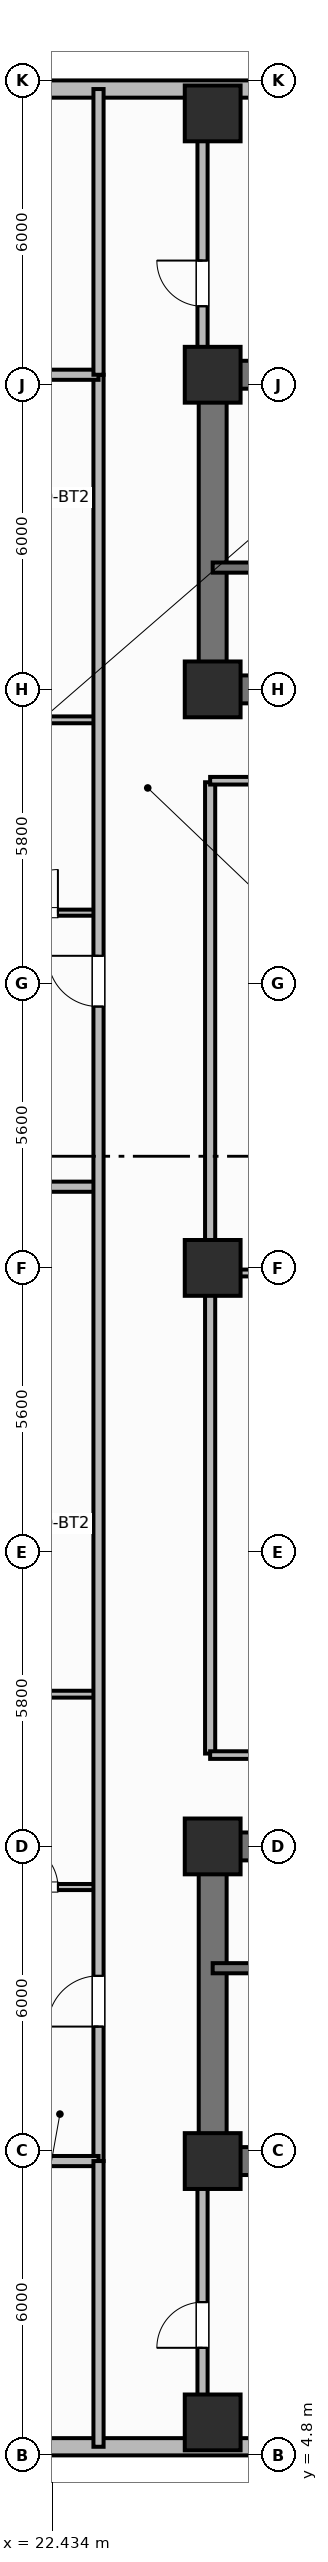
"""IFC4 building model, lengths in metres.
Left out: names, types, materials, properties, quantities, classifications, styles, units other than length and angle.
Written with IfcOpenShell. Run it as: python <this file> out.ifc"""

import sys

from ifc_helpers import new_model, si_unit, direction, frame, frame_2d, origin, origin_2d, place, context, subcontext, project, spatial, rectangle, extrude, element, fill, save


model = new_model("IFC4")
c1 = context("Model", 3, precision=1e-05, world=origin(), true_north=direction((0.0, 1.0)))
c2 = subcontext(c1, "Body", "Model", "MODEL_VIEW")
j1 = project(units=[si_unit("LENGTHUNIT", "METRE"), si_unit("PLANEANGLEUNIT", "RADIAN")], contexts=[c1])
p1 = place(None, origin())
s1 = spatial("IfcSite", under=j1, at=p1, CompositionType="ELEMENT")
p2 = place(p1, origin())
s2 = spatial("IfcBuilding", under=s1, at=p2, CompositionType="ELEMENT")
p3 = place(p2, frame((0.0, 0.0, 88.3)))
s3 = spatial("IfcBuildingStorey", under=s2, at=p3, CompositionType="ELEMENT", Elevation=88.3)
p4 = place(p3, frame((52.8, 10.6, 0.0), z_axis=(0.0, 0.0, 1.0), x_axis=(-1.0, 0.0, 0.0)))
e1 = element("IfcWall", 1, at=p4, inside=s3, PredefinedType="SHEAR", context=c2, shape_type="SweptSolid", body=[
    extrude(rectangle(XDim=27.2, YDim=0.55, at=frame_2d((13.6, 0.0))), origin(), (0.0, 0.0, 1.0), 3.7),
])
p5 = place(p3, frame((25.6, 10.875, 0.0), z_axis=(0.0, 0.0, 1.0), x_axis=(0.0, 1.0, 0.0)))
e2 = element("IfcWall", 2, at=p5, inside=s3, PredefinedType="SHEAR", context=c2, shape_type="SweptSolid", body=[
    extrude(rectangle(XDim=5.65, YDim=0.55, at=frame_2d((2.825, 0.0))), origin(), (0.0, 0.0, 1.0), 3.7),
])
p6 = place(p3, frame((25.6, 16.8, 0.0), z_axis=(0.0, 0.0, 1.0), x_axis=(1.0, 0.0, 0.0)))
e3 = element("IfcWall", 3, at=p6, inside=s3, PredefinedType="SHEAR", context=c2, shape_type="SweptSolid", body=[
    extrude(rectangle(XDim=27.2, YDim=0.55, at=frame_2d((13.6, 0.0))), origin(), (0.0, 0.0, 1.0), 3.7),
])
p7 = place(p6, frame((1.9, 0.0, 0.0)))
e4 = element("IfcOpeningElement", 4, at=p7, cuts=e3, PredefinedType="OPENING", context=c2, shape_type="SweptSolid", body=[
    extrude(rectangle(XDim=1.1, YDim=2.15, at=frame_2d((0.55, 1.075))), frame((0.0, 0.285, 0.0), z_axis=(0.0, -1.0, 0.0), x_axis=(1.0, 0.0, 0.0)), (0.0, 0.0, 1.0), 0.57),
])
p8 = place(p6, frame((13.0, 0.0, 0.0)))
e5 = element("IfcOpeningElement", 5, at=p8, cuts=e3, PredefinedType="OPENING", context=c2, shape_type="SweptSolid", body=[
    extrude(rectangle(XDim=1.2, YDim=2.15, at=frame_2d((0.6, 1.075))), frame((0.0, 0.285, 0.0), z_axis=(0.0, -1.0, 0.0), x_axis=(1.0, 0.0, 0.0)), (0.0, 0.0, 1.0), 0.57),
])
p9 = place(p6, frame((20.4, 0.0, 0.0)))
e6 = element("IfcOpeningElement", 6, at=p9, cuts=e3, PredefinedType="OPENING", context=c2, shape_type="SweptSolid", body=[
    extrude(rectangle(XDim=1.3, YDim=2.2, at=frame_2d((0.65, 1.1))), frame((0.0, 0.285, 0.0), z_axis=(0.0, -1.0, 0.0), x_axis=(1.0, 0.0, 0.0)), (0.0, 0.0, 1.0), 0.57),
])
p10 = place(p6, frame((24.65, 0.0, 0.0)))
e7 = element("IfcOpeningElement", 7, at=p10, cuts=e3, PredefinedType="OPENING", context=c2, shape_type="SweptSolid", body=[
    extrude(rectangle(XDim=0.85, YDim=2.1, at=frame_2d((0.425, 1.05))), frame((0.0, 0.285, 0.0), z_axis=(0.0, -1.0, 0.0), x_axis=(1.0, 0.0, 0.0)), (0.0, 0.0, 1.0), 0.57),
])
p11 = place(p3, frame((25.6, 45.8, 0.0), z_axis=(0.0, 0.0, 1.0), x_axis=(1.0, 0.0, 0.0)))
e8 = element("IfcWall", 8, at=p11, inside=s3, PredefinedType="SHEAR", context=c2, shape_type="SweptSolid", body=[
    extrude(rectangle(XDim=27.2, YDim=0.55, at=frame_2d((13.6, 0.0))), origin(), (0.0, 0.0, 1.0), 3.7),
])
p12 = place(p3, frame((25.6, 39.875, 0.0), z_axis=(0.0, 0.0, 1.0), x_axis=(0.0, 1.0, 0.0)))
e9 = element("IfcWall", 9, at=p12, inside=s3, PredefinedType="SHEAR", context=c2, shape_type="SweptSolid", body=[
    extrude(rectangle(XDim=5.65, YDim=0.55, at=frame_2d((2.825, 0.0))), origin(), (0.0, 0.0, 1.0), 3.7),
])
p13 = place(p3, frame((52.8, 39.6, 0.0), z_axis=(0.0, 0.0, 1.0), x_axis=(-1.0, 0.0, 0.0)))
e10 = element("IfcWall", 10, at=p13, inside=s3, PredefinedType="SHEAR", context=c2, shape_type="SweptSolid", body=[
    extrude(rectangle(XDim=27.2, YDim=0.55, at=frame_2d((13.6, 0.0))), origin(), (0.0, 0.0, 1.0), 3.7),
])
p14 = place(p13, frame((24.2, 0.0, 0.0)))
e11 = element("IfcOpeningElement", 11, at=p14, cuts=e10, PredefinedType="OPENING", context=c2, shape_type="SweptSolid", body=[
    extrude(rectangle(XDim=1.1, YDim=2.15, at=frame_2d((0.55, 1.075))), frame((0.0, 0.285, 0.0), z_axis=(0.0, -1.0, 0.0), x_axis=(1.0, 0.0, 0.0)), (0.0, 0.0, 1.0), 0.57),
])
p15 = place(p13, frame((15.1, 0.0, 0.0)))
e12 = element("IfcOpeningElement", 12, at=p15, cuts=e10, PredefinedType="OPENING", context=c2, shape_type="SweptSolid", body=[
    extrude(rectangle(XDim=1.2, YDim=2.15, at=frame_2d((0.6, 1.075))), frame((0.0, 0.285, 0.0), z_axis=(0.0, -1.0, 0.0), x_axis=(1.0, 0.0, 0.0)), (0.0, 0.0, 1.0), 0.57),
])
p16 = place(p13, frame((11.3, 0.0, 0.0)))
e13 = element("IfcOpeningElement", 13, at=p16, cuts=e10, PredefinedType="OPENING", context=c2, shape_type="SweptSolid", body=[
    extrude(rectangle(XDim=1.3, YDim=2.2, at=frame_2d((0.65, 1.1))), frame((0.0, 0.285, 0.0), z_axis=(0.0, -1.0, 0.0), x_axis=(1.0, 0.0, 0.0)), (0.0, 0.0, 1.0), 0.57),
])
p17 = place(p13, frame((7.25, 0.0, 0.0)))
e14 = element("IfcOpeningElement", 14, at=p17, cuts=e10, PredefinedType="OPENING", context=c2, shape_type="SweptSolid", body=[
    extrude(rectangle(XDim=0.85, YDim=2.1, at=frame_2d((0.425, 1.05))), frame((0.0, 0.285, 0.0), z_axis=(0.0, -1.0, 0.0), x_axis=(1.0, 0.0, 0.0)), (0.0, 0.0, 1.0), 0.57),
])
p18 = place(p13, frame((3.0, 0.0, 0.0)))
e15 = element("IfcOpeningElement", 15, at=p18, cuts=e10, PredefinedType="OPENING", context=c2, shape_type="SweptSolid", body=[
    extrude(rectangle(XDim=0.9, YDim=2.1, at=frame_2d((0.45, 1.05))), frame((0.0, 0.285, 0.0), z_axis=(0.0, -1.0, 0.0), x_axis=(1.0, 0.0, 0.0)), (0.0, 0.0, 1.0), 0.57),
])
for number, where, z_axis, x_axis in (
    (16, (25.6, 10.6, 0.0), (0.0, 0.0, 1.0), (1.0, 0.0, 0.0)),
    (17, (25.6, 16.8, 0.0), (0.0, 0.0, 1.0), (1.0, 0.0, 0.0)),
    (18, (25.6, 39.6, 0.0), (0.0, 0.0, 1.0), (1.0, 0.0, 0.0)),
    (19, (25.6, 45.8, 0.0), (0.0, 0.0, 1.0), (1.0, 0.0, 0.0)),
    (20, (25.6, 28.2, 0.0), (0.0, 0.0, 1.0), (1.0, 0.0, 0.0)),
    (21, (25.6, 5.45, 0.0), (0.0, 0.0, 1.0), (1.0, 0.0, 0.0)),
    (22, (25.6, 50.95, 0.0), (0.0, 0.0, 1.0), (1.0, 0.0, 0.0)),
):
    element("IfcColumn", number, at=place(p3, frame(where, z_axis=z_axis, x_axis=x_axis)), inside=s3, PredefinedType="COLUMN", context=c2, shape_type="SweptSolid", body=[
        extrude(rectangle(XDim=1.1, YDim=1.1, at=origin_2d()), origin(), (0.0, 0.0, 1.0), 3.7),
    ])
p19 = place(p3, frame((18.6, 4.97, 0.0), z_axis=(0.0, 0.0, 1.0), x_axis=(1.0, 0.0, 0.0)))
e23 = element("IfcWall", 23, at=p19, inside=s3, PredefinedType="SOLIDWALL", context=c2, shape_type="SweptSolid", body=[
    extrude(rectangle(XDim=17.4, YDim=0.34, at=frame_2d((8.7, 0.0))), origin(), (0.0, 0.0, 1.0), 2.7),
])
p20 = place(p19, frame((1.46, 0.0, 0.68)))
e24 = element("IfcOpeningElement", 24, at=p20, cuts=e23, PredefinedType="OPENING", context=c2, shape_type="SweptSolid", body=[
    extrude(rectangle(XDim=1.6, YDim=1.9, at=frame_2d((0.8, 0.95))), frame((0.0, 0.18, 0.0), z_axis=(0.0, -1.0, 0.0), x_axis=(1.0, 0.0, 0.0)), (0.0, 0.0, 1.0), 0.36),
])
p21 = place(p19, frame((8.25, 0.0, 0.68)))
e25 = element("IfcOpeningElement", 25, at=p21, cuts=e23, PredefinedType="OPENING", context=c2, shape_type="SweptSolid", body=[
    extrude(rectangle(XDim=1.6, YDim=1.9, at=frame_2d((0.8, 0.95))), frame((0.0, 0.18, 0.0), z_axis=(0.0, -1.0, 0.0), x_axis=(1.0, 0.0, 0.0)), (0.0, 0.0, 1.0), 0.36),
])
p22 = place(p19, frame((13.64, 0.0, 0.68)))
e26 = element("IfcOpeningElement", 26, at=p22, cuts=e23, PredefinedType="OPENING", context=c2, shape_type="SweptSolid", body=[
    extrude(rectangle(XDim=1.6, YDim=1.9, at=frame_2d((0.8, 0.95))), frame((0.0, 0.18, 0.0), z_axis=(0.0, -1.0, 0.0), x_axis=(1.0, 0.0, 0.0)), (0.0, 0.0, 1.0), 0.36),
])
p23 = place(p3, frame((36.0, 51.43, 0.0), z_axis=(0.0, 0.0, 1.0), x_axis=(-1.0, 0.0, 0.0)))
e27 = element("IfcWall", 27, at=p23, inside=s3, PredefinedType="SOLIDWALL", context=c2, shape_type="SweptSolid", body=[
    extrude(rectangle(XDim=17.4, YDim=0.34, at=frame_2d((8.7, 0.0))), origin(), (0.0, 0.0, 1.0), 2.7),
])
p24 = place(p23, frame((5.637, 0.0, 0.68)))
e28 = element("IfcOpeningElement", 28, at=p24, cuts=e27, PredefinedType="OPENING", context=c2, shape_type="SweptSolid", body=[
    extrude(rectangle(XDim=2.1, YDim=1.9, at=frame_2d((1.05, 0.95))), frame((0.0, 0.18, 0.0), z_axis=(0.0, -1.0, 0.0), x_axis=(1.0, 0.0, 0.0)), (0.0, 0.0, 1.0), 0.36),
])
p25 = place(p23, frame((13.688, 0.0, 0.68)))
e29 = element("IfcOpeningElement", 29, at=p25, cuts=e27, PredefinedType="OPENING", context=c2, shape_type="SweptSolid", body=[
    extrude(rectangle(XDim=2.1, YDim=1.9, at=frame_2d((1.05, 0.95))), frame((0.0, 0.18, 0.0), z_axis=(0.0, -1.0, 0.0), x_axis=(1.0, 0.0, 0.0)), (0.0, 0.0, 1.0), 0.36),
])
p26 = place(p3, frame((25.6, 14.4, 0.0), z_axis=(0.0, 0.0, 1.0), x_axis=(1.0, 0.0, 0.0)))
e30 = element("IfcWall", 30, at=p26, inside=s3, PredefinedType="SHEAR", context=c2, shape_type="SweptSolid", body=[
    extrude(rectangle(XDim=9.55, YDim=0.2, at=frame_2d((4.775, 0.0))), origin(), (0.0, 0.0, 1.0), 3.7),
])
p27 = place(p26, frame((1.05, 0.0, 0.0)))
e31 = element("IfcOpeningElement", 31, at=p27, cuts=e30, PredefinedType="OPENING", context=c2, shape_type="SweptSolid", body=[
    extrude(rectangle(XDim=1.1, YDim=2.15, at=frame_2d((0.55, 1.075))), frame((0.0, 0.11, 0.0), z_axis=(0.0, -1.0, 0.0), x_axis=(1.0, 0.0, 0.0)), (0.0, 0.0, 1.0), 0.22),
])
p28 = place(p3, frame((35.15, 42.0, 0.0), z_axis=(0.0, 0.0, 1.0), x_axis=(-1.0, 0.0, 0.0)))
e32 = element("IfcWall", 32, at=p28, inside=s3, PredefinedType="SHEAR", context=c2, shape_type="SweptSolid", body=[
    extrude(rectangle(XDim=9.55, YDim=0.2, at=frame_2d((4.775, 0.0))), origin(), (0.0, 0.0, 1.0), 3.7),
])
p29 = place(p28, frame((7.25, 0.0, 0.0)))
e33 = element("IfcOpeningElement", 33, at=p29, cuts=e32, PredefinedType="OPENING", context=c2, shape_type="SweptSolid", body=[
    extrude(rectangle(XDim=1.1, YDim=2.15, at=frame_2d((0.55, 1.075))), frame((0.0, 0.11, 0.0), z_axis=(0.0, -1.0, 0.0), x_axis=(1.0, 0.0, 0.0)), (0.0, 0.0, 1.0), 0.22),
])
p30 = place(p3, frame((25.55, 18.63, 0.0), z_axis=(0.0, 0.0, 1.0), x_axis=(0.0, 1.0, 0.0)))
e34 = element("IfcWall", 34, at=p30, inside=s3, PredefinedType="PARTITIONING", context=c2, shape_type="SweptSolid", body=[
    extrude(rectangle(XDim=19.14, YDim=0.2, at=frame_2d((9.57, 0.0))), origin(), (0.0, 0.0, 1.0), 2.53),
])
for number, where, z_axis, x_axis in (
    (35, (25.55, 18.6, 0.0), (0.0, 0.0, 1.0), (1.0, 0.0, 0.0)),
    (36, (25.55, 37.8, 0.0), (0.0, 0.0, 1.0), (1.0, 0.0, 0.0)),
):
    element("IfcWall", number, at=place(p3, frame(where, z_axis=z_axis, x_axis=x_axis)), inside=s3, PredefinedType="PARTITIONING", context=c2, shape_type="SweptSolid", body=[
        extrude(rectangle(XDim=6.5, YDim=0.15, at=frame_2d((3.25, 0.0))), origin(), (0.0, 0.0, 1.0), 2.53),
    ])
p31 = place(p3, frame((25.6, 28.1, 0.0), z_axis=(0.0, 0.0, 1.0), x_axis=(1.0, 0.0, 0.0)))
e37 = element("IfcWall", 37, at=p31, inside=s3, PredefinedType="PARTITIONING", context=c2, shape_type="SweptSolid", body=[
    extrude(rectangle(XDim=6.42, YDim=0.135, at=frame_2d((3.21, 0.0))), origin(), (0.0, 0.0, 1.0), 2.53),
])
p32 = place(p3, frame((21.1, 16.0, 0.0), z_axis=(0.0, 0.0, 1.0), x_axis=(1.0, 0.0, 0.0)))
e38 = element("IfcWall", 38, at=p32, inside=s3, PredefinedType="PARTITIONING", context=c2, shape_type="SweptSolid", body=[
    extrude(rectangle(XDim=2.25, YDim=0.12, at=frame_2d((1.125, 0.0))), origin(), (0.0, 0.0, 1.0), 2.53),
])
p33 = place(p32, frame((0.6, 0.0, 0.0)))
e39 = element("IfcOpeningElement", 39, at=p33, cuts=e38, PredefinedType="OPENING", context=c2, shape_type="SweptSolid", body=[
    extrude(rectangle(XDim=0.85, YDim=2.1, at=frame_2d((0.425, 1.05))), frame((0.0, 0.07, 0.0), z_axis=(0.0, -1.0, 0.0), x_axis=(1.0, 0.0, 0.0)), (0.0, 0.0, 1.0), 0.14),
])
p34 = place(p3, frame((21.1, 19.8, 0.0), z_axis=(0.0, 0.0, 1.0), x_axis=(1.0, 0.0, 0.0)))
e40 = element("IfcWall", 40, at=p34, inside=s3, PredefinedType="PARTITIONING", context=c2, shape_type="SweptSolid", body=[
    extrude(rectangle(XDim=2.25, YDim=0.135, at=frame_2d((1.125, 0.0))), origin(), (0.0, 0.0, 1.0), 2.53),
])
p35 = place(p3, frame((14.913, 29.8, 0.0), z_axis=(0.0, 0.0, 1.0), x_axis=(1.0, 0.0, 0.0)))
e41 = element("IfcWall", 41, at=p35, inside=s3, PredefinedType="PARTITIONING", context=c2, shape_type="SweptSolid", body=[
    extrude(rectangle(XDim=8.437, YDim=0.2, at=frame_2d((4.219, 0.0))), origin(), (0.0, 0.0, 1.0), 2.53),
])
p36 = place(p3, frame((21.1, 35.2, 0.0), z_axis=(0.0, 0.0, 1.0), x_axis=(1.0, 0.0, 0.0)))
e42 = element("IfcWall", 42, at=p36, inside=s3, PredefinedType="PARTITIONING", context=c2, shape_type="SweptSolid", body=[
    extrude(rectangle(XDim=2.25, YDim=0.12, at=frame_2d((1.125, 0.0))), origin(), (0.0, 0.0, 1.0), 2.53),
])
p37 = place(p36, frame((0.6, 0.0, 0.0)))
e43 = element("IfcOpeningElement", 43, at=p37, cuts=e42, PredefinedType="OPENING", context=c2, shape_type="SweptSolid", body=[
    extrude(rectangle(XDim=0.85, YDim=2.1, at=frame_2d((0.425, 1.05))), frame((0.0, 0.07, 0.0), z_axis=(0.0, -1.0, 0.0), x_axis=(1.0, 0.0, 0.0)), (0.0, 0.0, 1.0), 0.14),
])
p38 = place(p3, frame((21.1, 39.0, 0.0), z_axis=(0.0, 0.0, 1.0), x_axis=(1.0, 0.0, 0.0)))
e44 = element("IfcWall", 44, at=p38, inside=s3, PredefinedType="PARTITIONING", context=c2, shape_type="SweptSolid", body=[
    extrude(rectangle(XDim=2.25, YDim=0.135, at=frame_2d((1.125, 0.0))), origin(), (0.0, 0.0, 1.0), 2.53),
])
p39 = place(p3, frame((23.35, 10.6, 0.0), z_axis=(0.0, 0.0, 1.0), x_axis=(0.0, 1.0, 0.0)))
e45 = element("IfcWall", 45, at=p39, inside=s3, PredefinedType="PARTITIONING", context=c2, shape_type="SweptSolid", body=[
    extrude(rectangle(XDim=35.2, YDim=0.2, at=frame_2d((17.6, 0.0))), origin(), (0.0, 0.0, 1.0), 2.53),
])
p40 = place(p39, frame((2.65, 0.0, 0.0)))
e46 = element("IfcOpeningElement", 46, at=p40, cuts=e45, PredefinedType="OPENING", context=c2, shape_type="SweptSolid", body=[
    extrude(rectangle(XDim=1.0, YDim=2.15, at=frame_2d((0.5, 1.075))), frame((0.0, 0.11, 0.0), z_axis=(0.0, -1.0, 0.0), x_axis=(1.0, 0.0, 0.0)), (0.0, 0.0, 1.0), 0.22),
])
p41 = place(p39, frame((22.75, 0.0, 0.0)))
e47 = element("IfcOpeningElement", 47, at=p41, cuts=e45, PredefinedType="OPENING", context=c2, shape_type="SweptSolid", body=[
    extrude(rectangle(XDim=1.0, YDim=2.15, at=frame_2d((0.5, 1.075))), frame((0.0, 0.11, 0.0), z_axis=(0.0, -1.0, 0.0), x_axis=(1.0, 0.0, 0.0)), (0.0, 0.0, 1.0), 0.22),
])
for number, where, z_axis, x_axis in (
    (48, (14.99, 10.6, 0.0), (0.0, 0.0, 1.0), (1.0, 0.0, 0.0)),
    (49, (14.99, 45.8, 0.0), (0.0, 0.0, 1.0), (1.0, 0.0, 0.0)),
):
    element("IfcWall", number, at=place(p3, frame(where, z_axis=z_axis, x_axis=x_axis)), inside=s3, PredefinedType="PARTITIONING", context=c2, shape_type="SweptSolid", body=[
        extrude(rectangle(XDim=8.36, YDim=0.2, at=frame_2d((4.18, 0.0))), origin(), (0.0, 0.0, 1.0), 2.53),
    ])
p42 = place(p3, frame((23.35, 4.97, 0.0), z_axis=(0.0, 0.0, 1.0), x_axis=(0.0, 1.0, 0.0)))
e50 = element("IfcWall", 50, at=p42, inside=s3, PredefinedType="PARTITIONING", context=c2, shape_type="SweptSolid", body=[
    extrude(rectangle(XDim=5.63, YDim=0.2, at=frame_2d((2.815, 0.0))), origin(), (0.0, 0.0, 1.0), 2.53),
])
p43 = place(p3, frame((23.35, 45.8, 0.0), z_axis=(0.0, 0.0, 1.0), x_axis=(0.0, 1.0, 0.0)))
e51 = element("IfcWall", 51, at=p43, inside=s3, PredefinedType="PARTITIONING", context=c2, shape_type="SweptSolid", body=[
    extrude(rectangle(XDim=5.63, YDim=0.2, at=frame_2d((2.815, 0.0))), origin(), (0.0, 0.0, 1.0), 2.53),
])
p44 = place(p3, frame((25.4, 5.62, 0.0), z_axis=(0.0, 0.0, 1.0), x_axis=(0.0, 1.0, 0.0)))
e52 = element("IfcWall", 52, at=p44, inside=s3, PredefinedType="PARTITIONING", context=c2, shape_type="SweptSolid", body=[
    extrude(rectangle(XDim=4.68, YDim=0.2, at=frame_2d((2.34, 0.0))), origin(), (0.0, 0.0, 1.0), 2.53),
])
p45 = place(p44, frame((1.3, 0.0, 0.0)))
e53 = element("IfcOpeningElement", 53, at=p45, cuts=e52, PredefinedType="OPENING", context=c2, shape_type="SweptSolid", body=[
    extrude(rectangle(XDim=0.9, YDim=2.1, at=frame_2d((0.45, 1.05))), frame((0.0, 0.11, 0.0), z_axis=(0.0, -1.0, 0.0), x_axis=(1.0, 0.0, 0.0)), (0.0, 0.0, 1.0), 0.22),
])
p46 = place(p3, frame((25.4, 46.1, 0.0), z_axis=(0.0, 0.0, 1.0), x_axis=(0.0, 1.0, 0.0)))
e54 = element("IfcWall", 54, at=p46, inside=s3, PredefinedType="PARTITIONING", context=c2, shape_type="SweptSolid", body=[
    extrude(rectangle(XDim=4.68, YDim=0.2, at=frame_2d((2.34, 0.0))), origin(), (0.0, 0.0, 1.0), 2.53),
])
p47 = place(p46, frame((1.05, 0.0, 0.0)))
e55 = element("IfcOpeningElement", 55, at=p47, cuts=e54, PredefinedType="OPENING", context=c2, shape_type="SweptSolid", body=[
    extrude(rectangle(XDim=0.9, YDim=2.1, at=frame_2d((0.45, 1.05))), frame((0.0, 0.11, 0.0), z_axis=(0.0, -1.0, 0.0), x_axis=(1.0, 0.0, 0.0)), (0.0, 0.0, 1.0), 0.22),
])
p48 = place(p33, origin())
e56 = element("IfcDoor", 56, at=p48, inside=s3, OperationType="SINGLE_SWING_LEFT", PredefinedType="DOOR", context=c2, shape_type="SweptSolid", body=[
    extrude(rectangle(XDim=0.85, YDim=2.1, at=frame_2d((0.425, 1.05))), frame((0.0, 0.025, 0.0), z_axis=(0.0, -1.0, 0.0), x_axis=(1.0, 0.0, 0.0)), (0.0, 0.0, 1.0), 0.05),
])
fill(e39, e56)
p49 = place(p37, origin())
e57 = element("IfcDoor", 57, at=p49, inside=s3, OperationType="SINGLE_SWING_RIGHT", PredefinedType="DOOR", context=c2, shape_type="SweptSolid", body=[
    extrude(rectangle(XDim=0.85, YDim=2.1, at=frame_2d((0.425, 1.05))), frame((0.0, 0.025, 0.0), z_axis=(0.0, -1.0, 0.0), x_axis=(1.0, 0.0, 0.0)), (0.0, 0.0, 1.0), 0.05),
])
fill(e43, e57)
p50 = place(p40, origin())
e58 = element("IfcDoor", 58, at=p50, inside=s3, OperationType="SINGLE_SWING_LEFT", PredefinedType="DOOR", context=c2, shape_type="SweptSolid", body=[
    extrude(rectangle(XDim=1.0, YDim=2.15, at=frame_2d((0.5, 1.075))), frame((0.0, 0.025, 0.0), z_axis=(0.0, -1.0, 0.0), x_axis=(1.0, 0.0, 0.0)), (0.0, 0.0, 1.0), 0.05),
])
fill(e46, e58)
p51 = place(p41, origin())
e59 = element("IfcDoor", 59, at=p51, inside=s3, OperationType="SINGLE_SWING_RIGHT", PredefinedType="DOOR", context=c2, shape_type="SweptSolid", body=[
    extrude(rectangle(XDim=1.0, YDim=2.15, at=frame_2d((0.5, 1.075))), frame((0.0, 0.025, 0.0), z_axis=(0.0, -1.0, 0.0), x_axis=(1.0, 0.0, 0.0)), (0.0, 0.0, 1.0), 0.05),
])
fill(e47, e59)
p52 = place(p45, origin())
e60 = element("IfcDoor", 60, at=p52, inside=s3, OperationType="SINGLE_SWING_LEFT", PredefinedType="DOOR", context=c2, shape_type="SweptSolid", body=[
    extrude(rectangle(XDim=0.9, YDim=2.1, at=frame_2d((0.45, 1.05))), frame((0.0, 0.025, 0.0), z_axis=(0.0, -1.0, 0.0), x_axis=(1.0, 0.0, 0.0)), (0.0, 0.0, 1.0), 0.05),
])
fill(e53, e60)
p53 = place(p47, origin())
e61 = element("IfcDoor", 61, at=p53, inside=s3, OperationType="SINGLE_SWING_RIGHT", PredefinedType="DOOR", context=c2, shape_type="SweptSolid", body=[
    extrude(rectangle(XDim=0.9, YDim=2.1, at=frame_2d((0.45, 1.05))), frame((0.0, 0.025, 0.0), z_axis=(0.0, -1.0, 0.0), x_axis=(1.0, 0.0, 0.0)), (0.0, 0.0, 1.0), 0.05),
])
fill(e55, e61)
save(model, sys.argv[1])
